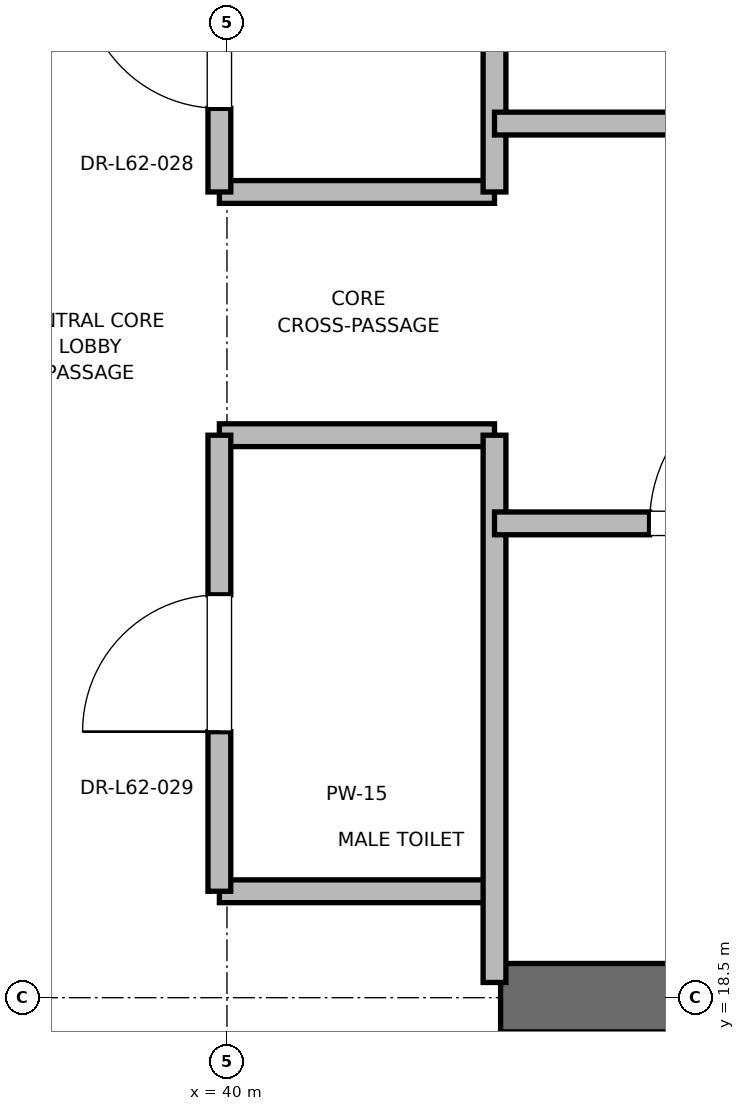
"""IFC4 building model, lengths in metres.
Left out: names, types, materials, properties, quantities, classifications, styles, units other than length and angle.
Written with IfcOpenShell. Run it as: python <this file> out.ifc"""

import sys

from ifc_helpers import new_model, si_unit, direction, frame, frame_2d, origin, place, context, subcontext, project, spatial, rectangle, extrude, element, fill, save


model = new_model("IFC4")
c1 = context("Model", 3, precision=1e-05, world=origin(), true_north=direction((0.0, 1.0)))
c2 = subcontext(c1, "Body", "Model", "MODEL_VIEW")
j1 = project(units=[si_unit("LENGTHUNIT", "METRE"), si_unit("PLANEANGLEUNIT", "RADIAN")], contexts=[c1])
p1 = place(None, origin())
s1 = spatial("IfcSite", under=j1, at=p1, CompositionType="ELEMENT")
p2 = place(p1, origin())
s2 = spatial("IfcBuilding", under=s1, at=p2, CompositionType="ELEMENT")
p3 = place(p2, frame((0.0, 0.0, 267.2)))
s3 = spatial("IfcBuildingStorey", under=s2, at=p3, CompositionType="ELEMENT", Elevation=267.2)
p4 = place(p3, frame((41.8, 18.5, 0.0), z_axis=(0.0, 0.0, 1.0), x_axis=(1.0, 0.0, 0.0)))
e1 = element("IfcWall", 1, at=p4, inside=s3, PredefinedType="SHEAR", context=c2, shape_type="SweptSolid", body=[
    extrude(rectangle(XDim=9.2, YDim=0.45, at=frame_2d((4.6, 0.0))), origin(), (0.0, 0.0, 1.0), 3.785),
])
for number, where, z_axis, x_axis in (
    (2, (39.95, 19.2, 0.0), (0.0, 0.0, 1.0), (1.0, 0.0, 0.0)),
    (3, (39.95, 22.2, 0.0), (0.0, 0.0, 1.0), (1.0, 0.0, 0.0)),
    (4, (39.95, 23.8, 0.0), (0.0, 0.0, 1.0), (1.0, 0.0, 0.0)),
):
    element("IfcWall", number, at=place(p3, frame(where, z_axis=z_axis, x_axis=x_axis)), inside=s3, PredefinedType="PARTITIONING", context=c2, shape_type="SweptSolid", body=[
        extrude(rectangle(XDim=1.81, YDim=0.15, at=frame_2d((0.905, 0.0))), origin(), (0.0, 0.0, 1.0), 2.85),
    ])
p5 = place(p3, frame((41.76, 18.6, 0.0), z_axis=(0.0, 0.0, 1.0), x_axis=(0.0, 1.0, 0.0)))
e5 = element("IfcWall", 5, at=p5, inside=s3, PredefinedType="PARTITIONING", context=c2, shape_type="SweptSolid", body=[
    extrude(rectangle(XDim=3.6, YDim=0.15, at=frame_2d((1.8, 0.0))), origin(), (0.0, 0.0, 1.0), 2.85),
])
p6 = place(p3, frame((41.76, 23.8, 0.0), z_axis=(0.0, 0.0, 1.0), x_axis=(0.0, 1.0, 0.0)))
e6 = element("IfcWall", 6, at=p6, inside=s3, PredefinedType="PARTITIONING", context=c2, shape_type="SweptSolid", body=[
    extrude(rectangle(XDim=4.0, YDim=0.15, at=frame_2d((2.0, 0.0))), origin(), (0.0, 0.0, 1.0), 2.85),
])
p7 = place(p3, frame((39.95, 19.2, 0.0), z_axis=(0.0, 0.0, 1.0), x_axis=(0.0, 1.0, 0.0)))
e7 = element("IfcWall", 7, at=p7, inside=s3, PredefinedType="PARTITIONING", context=c2, shape_type="SweptSolid", body=[
    extrude(rectangle(XDim=3.0, YDim=0.15, at=frame_2d((1.5, 0.0))), origin(), (0.0, 0.0, 1.0), 2.85),
])
p8 = place(p7, frame((1.05, 0.0, 0.0)))
e8 = element("IfcOpeningElement", 8, at=p8, cuts=e7, PredefinedType="OPENING", context=c2, shape_type="SweptSolid", body=[
    extrude(rectangle(XDim=0.9, YDim=2.1, at=frame_2d((0.45, 1.05))), frame((0.0, 0.075, 0.0), z_axis=(0.0, -1.0, 0.0), x_axis=(1.0, 0.0, 0.0)), (0.0, 0.0, 1.0), 0.15),
])
p9 = place(p3, frame((39.95, 23.8, 0.0), z_axis=(0.0, 0.0, 1.0), x_axis=(0.0, 1.0, 0.0)))
e9 = element("IfcWall", 9, at=p9, inside=s3, PredefinedType="PARTITIONING", context=c2, shape_type="SweptSolid", body=[
    extrude(rectangle(XDim=2.0, YDim=0.15, at=frame_2d((1.0, 0.0))), origin(), (0.0, 0.0, 1.0), 2.85),
])
p10 = place(p9, frame((0.55, 0.0, 0.0)))
e10 = element("IfcOpeningElement", 10, at=p10, cuts=e9, PredefinedType="OPENING", context=c2, shape_type="SweptSolid", body=[
    extrude(rectangle(XDim=0.9, YDim=2.1, at=frame_2d((0.45, 1.05))), frame((0.0, 0.075, 0.0), z_axis=(0.0, -1.0, 0.0), x_axis=(1.0, 0.0, 0.0)), (0.0, 0.0, 1.0), 0.15),
])
p11 = place(p3, frame((41.76, 21.62, 0.0), z_axis=(0.0, 0.0, 1.0), x_axis=(1.0, 0.0, 0.0)))
e11 = element("IfcWall", 11, at=p11, inside=s3, PredefinedType="PARTITIONING", context=c2, shape_type="SweptSolid", body=[
    extrude(rectangle(XDim=3.04, YDim=0.15, at=frame_2d((1.52, 0.0))), origin(), (0.0, 0.0, 1.0), 2.85),
])
p12 = place(p11, frame((1.02, 0.0, 0.0)))
e12 = element("IfcOpeningElement", 12, at=p12, cuts=e11, PredefinedType="OPENING", context=c2, shape_type="SweptSolid", body=[
    extrude(rectangle(XDim=1.0, YDim=2.15, at=frame_2d((0.5, 1.075))), frame((0.0, 0.075, 0.0), z_axis=(0.0, -1.0, 0.0), x_axis=(1.0, 0.0, 0.0)), (0.0, 0.0, 1.0), 0.15),
])
p13 = place(p3, frame((41.76, 24.25, 0.0), z_axis=(0.0, 0.0, 1.0), x_axis=(1.0, 0.0, 0.0)))
e13 = element("IfcWall", 13, at=p13, inside=s3, PredefinedType="PARTITIONING", context=c2, shape_type="SweptSolid", body=[
    extrude(rectangle(XDim=3.39, YDim=0.15, at=frame_2d((1.695, 0.0))), origin(), (0.0, 0.0, 1.0), 2.85),
])
p14 = place(p13, frame((1.255, 0.0, 0.0)))
e14 = element("IfcOpeningElement", 14, at=p14, cuts=e13, PredefinedType="OPENING", context=c2, shape_type="SweptSolid", body=[
    extrude(rectangle(XDim=0.88, YDim=2.1, at=frame_2d((0.44, 1.05))), frame((0.0, 0.075, 0.0), z_axis=(0.0, -1.0, 0.0), x_axis=(1.0, 0.0, 0.0)), (0.0, 0.0, 1.0), 0.15),
])
p15 = place(p8, origin())
e15 = element("IfcDoor", 15, at=p15, inside=s3, OperationType="SINGLE_SWING_LEFT", PredefinedType="DOOR", context=c2, shape_type="SweptSolid", body=[
    extrude(rectangle(XDim=0.9, YDim=2.1, at=frame_2d((0.45, 1.05))), frame((0.0, 0.025, 0.0), z_axis=(0.0, -1.0, 0.0), x_axis=(1.0, 0.0, 0.0)), (0.0, 0.0, 1.0), 0.05),
])
fill(e8, e15)
p16 = place(p10, origin())
e16 = element("IfcDoor", 16, at=p16, inside=s3, OperationType="SINGLE_SWING_RIGHT", PredefinedType="DOOR", context=c2, shape_type="SweptSolid", body=[
    extrude(rectangle(XDim=0.9, YDim=2.1, at=frame_2d((0.45, 1.05))), frame((0.0, 0.025, 0.0), z_axis=(0.0, -1.0, 0.0), x_axis=(1.0, 0.0, 0.0)), (0.0, 0.0, 1.0), 0.05),
])
fill(e10, e16)
p17 = place(p12, origin())
e17 = element("IfcDoor", 17, at=p17, inside=s3, OperationType="SINGLE_SWING_RIGHT", PredefinedType="DOOR", context=c2, shape_type="SweptSolid", body=[
    extrude(rectangle(XDim=1.0, YDim=2.15, at=frame_2d((0.5, 1.075))), frame((0.0, 0.025, 0.0), z_axis=(0.0, -1.0, 0.0), x_axis=(1.0, 0.0, 0.0)), (0.0, 0.0, 1.0), 0.05),
])
fill(e12, e17)
save(model, sys.argv[1])
